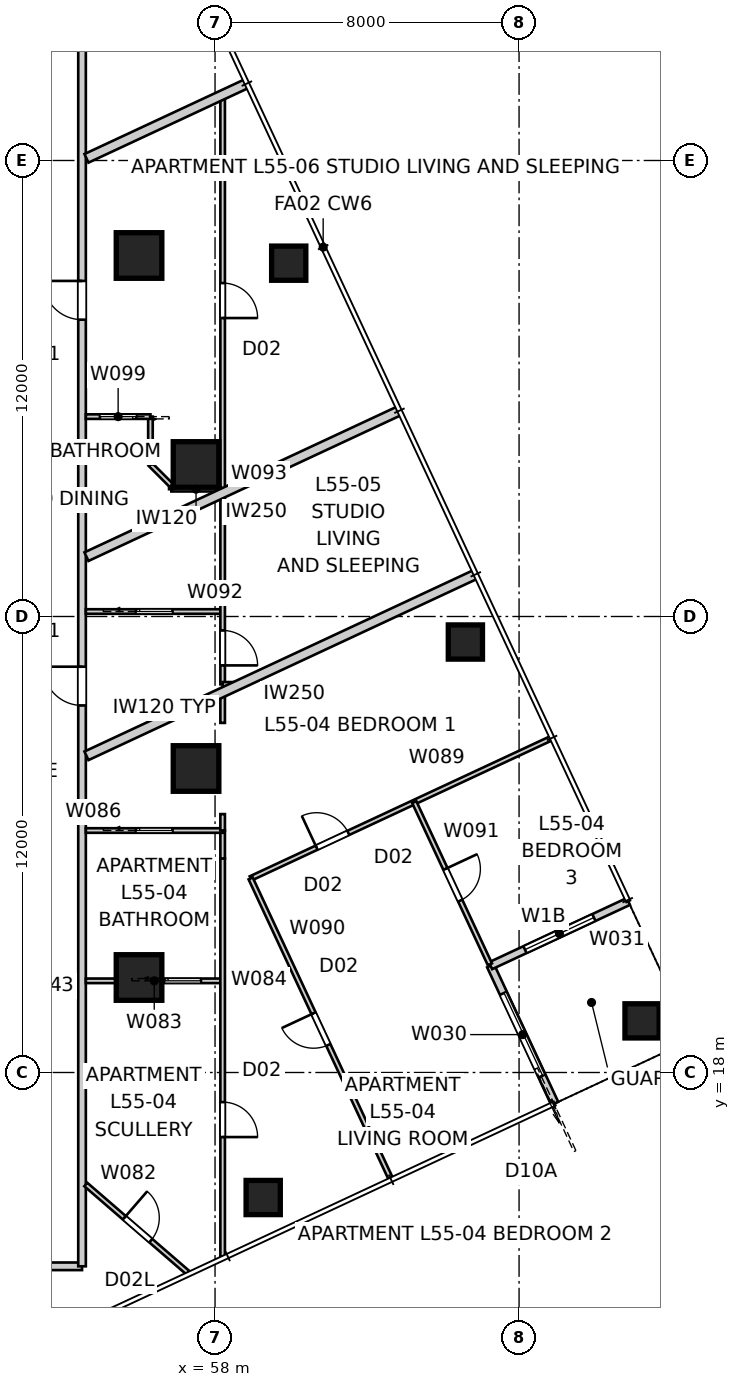
"""IFC4 building model, lengths in metres.
Left out: names, types, materials, properties, quantities, classifications, styles, units other than length and angle.
Written with IfcOpenShell. Run it as: python <this file> out.ifc"""

import sys

from ifc_helpers import new_model, si_unit, direction, frame, frame_2d, origin, origin_2d, place, context, subcontext, project, spatial, rectangle, extrude, element, fill, save


model = new_model("IFC4")
c1 = context("Model", 3, precision=1e-05, world=origin(), true_north=direction((0.0, 1.0)))
c2 = subcontext(c1, "Body", "Model", "MODEL_VIEW")
j1 = project(units=[si_unit("LENGTHUNIT", "METRE"), si_unit("PLANEANGLEUNIT", "RADIAN")], contexts=[c1])
p1 = place(None, origin())
s1 = spatial("IfcSite", under=j1, at=p1, CompositionType="ELEMENT")
p2 = place(p1, origin())
s2 = spatial("IfcBuilding", under=s1, at=p2, CompositionType="ELEMENT")
p3 = place(p2, frame((0.0, 0.0, 199.8)))
s3 = spatial("IfcBuildingStorey", under=s2, at=p3, CompositionType="ELEMENT", Elevation=199.8)
for number, where, z_axis, x_axis in (
    (1, (59.267, 14.71, 0.0), (0.0, 0.0, 1.0), (1.0, 0.0, 0.0)),
    (2, (69.236, 19.359, 0.0), (0.0, 0.0, 1.0), (1.0, 0.0, 0.0)),
    (3, (64.588, 29.328, 0.0), (0.0, 0.0, 1.0), (1.0, 0.0, 0.0)),
    (4, (59.939, 39.298, 0.0), (0.0, 0.0, 1.0), (1.0, 0.0, 0.0)),
):
    element("IfcColumn", number, at=place(p3, frame(where, z_axis=z_axis, x_axis=x_axis)), inside=s3, PredefinedType="COLUMN", context=c2, shape_type="SweptSolid", body=[
        extrude(rectangle(XDim=0.9, YDim=0.9, at=origin_2d()), origin(), (0.0, 0.0, 1.0), 3.2),
    ])
for number, where, z_axis, x_axis in (
    (5, (57.5, 26.0, 0.0), (0.0, 0.0, 1.0), (1.0, 0.0, 0.0)),
    (6, (57.5, 34.0, 0.0), (0.0, 0.0, 1.0), (1.0, 0.0, 0.0)),
    (7, (56.0, 39.5, 0.0), (0.0, 0.0, 1.0), (1.0, 0.0, 0.0)),
    (8, (56.0, 20.5, 0.0), (0.0, 0.0, 1.0), (1.0, 0.0, 0.0)),
):
    element("IfcColumn", number, at=place(p3, frame(where, z_axis=z_axis, x_axis=x_axis)), inside=s3, PredefinedType="COLUMN", context=c2, shape_type="SweptSolid", body=[
        extrude(rectangle(XDim=1.2, YDim=1.2, at=origin_2d()), origin(), (0.0, 0.0, 1.0), 3.4),
    ])
p4 = place(p3, frame((66.94, 17.185, 0.0), z_axis=(0.0, 0.0, 1.0), x_axis=(-0.422658246362, 0.906289140828, 0.0)))
e9 = element("IfcWall", 9, at=p4, inside=s3, PredefinedType="SOLIDWALL", context=c2, shape_type="SweptSolid", body=[
    extrude(rectangle(XDim=4.0, YDim=0.2, at=frame_2d((2.0, 0.0))), origin(), (0.0, 0.0, 1.0), 3.2),
])
p5 = place(p4, frame((0.8, 0.0, 0.0)))
e10 = element("IfcOpeningElement", 10, at=p5, cuts=e9, PredefinedType="OPENING", context=c2, shape_type="SweptSolid", body=[
    extrude(rectangle(XDim=2.4, YDim=2.1, at=frame_2d((1.2, 1.05))), frame((0.0, 0.11, 0.0), z_axis=(0.0, -1.0, 0.0), x_axis=(1.0, 0.0, 0.0)), (0.0, 0.0, 1.0), 0.22),
])
p6 = place(p3, frame((65.25, 20.81, 0.0), z_axis=(0.0, 0.0, 1.0), x_axis=(0.906289140828, 0.422658246362, 0.0)))
e11 = element("IfcWall", 11, at=p6, inside=s3, PredefinedType="SOLIDWALL", context=c2, shape_type="SweptSolid", body=[
    extrude(rectangle(XDim=4.0, YDim=0.2, at=frame_2d((2.0, 0.0))), origin(), (0.0, 0.0, 1.0), 3.2),
])
p7 = place(p6, frame((1.0, 0.0, 0.4)))
e12 = element("IfcOpeningElement", 12, at=p7, cuts=e11, PredefinedType="OPENING", context=c2, shape_type="SweptSolid", body=[
    extrude(rectangle(XDim=2.0, YDim=1.8, at=frame_2d((1.0, 0.9))), frame((0.0, 0.11, 0.0), z_axis=(0.0, -1.0, 0.0), x_axis=(1.0, 0.0, 0.0)), (0.0, 0.0, 1.0), 0.22),
])
p8 = place(p3, frame((46.403, 12.9, 0.0), z_axis=(0.0, 0.0, 1.0), x_axis=(1.0, 0.0, 0.0)))
e13 = element("IfcWall", 13, at=p8, inside=s3, PredefinedType="PARTITIONING", context=c2, shape_type="SweptSolid", body=[
    extrude(rectangle(XDim=8.097, YDim=0.2, at=frame_2d((4.048, 0.0))), origin(), (0.0, 0.0, 1.0), 3.2),
])
p9 = place(p8, frame((4.112, 0.0, 0.0)))
e14 = element("IfcOpeningElement", 14, at=p9, cuts=e13, PredefinedType="OPENING", context=c2, shape_type="SweptSolid", body=[
    extrude(rectangle(XDim=1.02, YDim=2.34, at=frame_2d((0.51, 1.17))), frame((0.0, 0.11, 0.0), z_axis=(0.0, -1.0, 0.0), x_axis=(1.0, 0.0, 0.0)), (0.0, 0.0, 1.0), 0.22),
])
p10 = place(p3, frame((54.5, 12.9, 0.0), z_axis=(0.0, 0.0, 1.0), x_axis=(0.0, 1.0, 0.0)))
e15 = element("IfcWall", 15, at=p10, inside=s3, PredefinedType="PARTITIONING", context=c2, shape_type="SweptSolid", body=[
    extrude(rectangle(XDim=33.8, YDim=0.2, at=frame_2d((16.9, 0.0))), origin(), (0.0, 0.0, 1.0), 3.2),
])
p11 = place(p10, frame((24.911, 0.0, 0.0)))
e16 = element("IfcOpeningElement", 16, at=p11, cuts=e15, PredefinedType="OPENING", context=c2, shape_type="SweptSolid", body=[
    extrude(rectangle(XDim=1.02, YDim=2.34, at=frame_2d((0.51, 1.17))), frame((0.0, 0.11, 0.0), z_axis=(0.0, -1.0, 0.0), x_axis=(1.0, 0.0, 0.0)), (0.0, 0.0, 1.0), 0.22),
])
p12 = place(p10, frame((14.759, 0.0, 0.0)))
e17 = element("IfcOpeningElement", 17, at=p12, cuts=e15, PredefinedType="OPENING", context=c2, shape_type="SweptSolid", body=[
    extrude(rectangle(XDim=1.02, YDim=2.34, at=frame_2d((0.51, 1.17))), frame((0.0, 0.11, 0.0), z_axis=(0.0, -1.0, 0.0), x_axis=(1.0, 0.0, 0.0)), (0.0, 0.0, 1.0), 0.22),
])
p13 = place(p3, frame((62.853, 35.415, 0.0), z_axis=(0.0, 0.0, 1.0), x_axis=(-0.90630664327, -0.422620714548, 0.0)))
e18 = element("IfcWall", 18, at=p13, inside=s3, PredefinedType="PARTITIONING", context=c2, shape_type="SweptSolid", body=[
    extrude(rectangle(XDim=9.088, YDim=0.25, at=frame_2d((4.544, 0.0))), origin(), (0.0, 0.0, 1.0), 3.2),
])
p14 = place(p3, frame((58.838, 44.025, 0.0), z_axis=(0.0, 0.0, 1.0), x_axis=(-0.906317010604, -0.422598481173, 0.0)))
e19 = element("IfcWall", 19, at=p14, inside=s3, PredefinedType="PARTITIONING", context=c2, shape_type="SweptSolid", body=[
    extrude(rectangle(XDim=4.657, YDim=0.25, at=frame_2d((2.329, 0.0))), origin(), (0.0, 0.0, 1.0), 3.2),
])
p15 = place(p3, frame((64.86, 31.11, 0.0), z_axis=(0.0, 0.0, 1.0), x_axis=(-0.906306714884, -0.422620560972, 0.0)))
e20 = element("IfcWall", 20, at=p15, inside=s3, PredefinedType="PARTITIONING", context=c2, shape_type="SweptSolid", body=[
    extrude(rectangle(XDim=11.302, YDim=0.25, at=frame_2d((5.651, 0.0))), origin(), (0.0, 0.0, 1.0), 3.2),
])
p16 = place(p3, frame((54.6, 15.052, 0.0), z_axis=(0.0, 0.0, 1.0), x_axis=(0.756558808476, -0.653925660391, 0.0)))
e21 = element("IfcWall", 21, at=p16, inside=s3, PredefinedType="PARTITIONING", context=c2, shape_type="SweptSolid", body=[
    extrude(rectangle(XDim=3.554, YDim=0.12, at=frame_2d((1.777, 0.0))), origin(), (0.0, 0.0, 1.0), 3.2),
])
p17 = place(p16, frame((1.339, 0.0, 0.0)))
e22 = element("IfcOpeningElement", 22, at=p17, cuts=e21, PredefinedType="OPENING", context=c2, shape_type="SweptSolid", body=[
    extrude(rectangle(XDim=0.92, YDim=2.1, at=frame_2d((0.46, 1.05))), frame((0.0, 0.07, 0.0), z_axis=(0.0, -1.0, 0.0), x_axis=(1.0, 0.0, 0.0)), (0.0, 0.0, 1.0), 0.14),
])
p18 = place(p3, frame((54.6, 20.413, 0.0), z_axis=(0.0, 0.0, 1.0), x_axis=(1.0, 0.0, 0.0)))
e23 = element("IfcWall", 23, at=p18, inside=s3, PredefinedType="PARTITIONING", context=c2, shape_type="SweptSolid", body=[
    extrude(rectangle(XDim=3.6, YDim=0.12, at=frame_2d((1.8, 0.0))), origin(), (0.0, 0.0, 1.0), 3.2),
])
p19 = place(p18, frame((2.07, 0.0, 0.0)))
e24 = element("IfcOpeningElement", 24, at=p19, cuts=e23, PredefinedType="OPENING", context=c2, shape_type="SweptSolid", body=[
    extrude(rectangle(XDim=0.96, YDim=2.1, at=frame_2d((0.48, 1.05))), frame((0.0, 0.07, 0.0), z_axis=(0.0, -1.0, 0.0), x_axis=(1.0, 0.0, 0.0)), (0.0, 0.0, 1.0), 0.14),
])
p20 = place(p3, frame((58.2, 23.632, 0.0), z_axis=(0.0, 0.0, 1.0), x_axis=(0.0, -1.0, 0.0)))
e25 = element("IfcWall", 25, at=p20, inside=s3, PredefinedType="PARTITIONING", context=c2, shape_type="SweptSolid", body=[
    extrude(rectangle(XDim=10.479, YDim=0.12, at=frame_2d((5.24, 0.0))), origin(), (0.0, 0.0, 1.0), 3.2),
])
p21 = place(p20, frame((6.411, 0.0, 0.0)))
e26 = element("IfcOpeningElement", 26, at=p21, cuts=e25, PredefinedType="OPENING", context=c2, shape_type="SweptSolid", body=[
    extrude(rectangle(XDim=0.92, YDim=2.34, at=frame_2d((0.46, 1.17))), frame((0.0, 0.07, 0.0), z_axis=(0.0, -1.0, 0.0), x_axis=(1.0, 0.0, 0.0)), (0.0, 0.0, 1.0), 0.14),
])
p22 = place(p3, frame((54.6, 24.368, 0.0), z_axis=(0.0, 0.0, 1.0), x_axis=(1.0, 0.0, 0.0)))
e27 = element("IfcWall", 27, at=p22, inside=s3, PredefinedType="PARTITIONING", context=c2, shape_type="SweptSolid", body=[
    extrude(rectangle(XDim=3.6, YDim=0.12, at=frame_2d((1.8, 0.0))), origin(), (0.0, 0.0, 1.0), 3.2),
])
p23 = place(p22, frame((1.32, 0.0, 0.0)))
e28 = element("IfcOpeningElement", 28, at=p23, cuts=e27, PredefinedType="OPENING", context=c2, shape_type="SweptSolid", body=[
    extrude(rectangle(XDim=0.96, YDim=2.1, at=frame_2d((0.48, 1.05))), frame((0.0, 0.07, 0.0), z_axis=(0.0, -1.0, 0.0), x_axis=(1.0, 0.0, 0.0)), (0.0, 0.0, 1.0), 0.14),
])
p24 = place(p3, frame((58.2, 24.8, 0.0), z_axis=(0.0, 0.0, 1.0), x_axis=(0.0, -1.0, 0.0)))
e29 = element("IfcWall", 29, at=p24, inside=s3, PredefinedType="PARTITIONING", context=c2, shape_type="SweptSolid", body=[
    extrude(rectangle(XDim=0.432, YDim=0.12, at=frame_2d((0.216, 0.0))), origin(), (0.0, 0.0, 1.0), 3.2),
])
p25 = place(p3, frame((58.2, 28.005, 0.0), z_axis=(0.0, 0.0, 1.0), x_axis=(0.0, -1.0, 0.0)))
e30 = element("IfcWall", 30, at=p25, inside=s3, PredefinedType="PARTITIONING", context=c2, shape_type="SweptSolid", body=[
    extrude(rectangle(XDim=0.805, YDim=0.12, at=frame_2d((0.402, 0.0))), origin(), (0.0, 0.0, 1.0), 3.2),
])
p26 = place(p3, frame((58.937, 23.107, 0.0), z_axis=(0.0, 0.0, 1.0), x_axis=(0.906298398156, 0.422638395676, 0.0)))
e31 = element("IfcWall", 31, at=p26, inside=s3, PredefinedType="PARTITIONING", context=c2, shape_type="SweptSolid", body=[
    extrude(rectangle(XDim=8.71, YDim=0.12, at=frame_2d((4.355, 0.0))), origin(), (0.0, 0.0, 1.0), 3.2),
])
p27 = place(p26, frame((1.915, 0.0, 0.0)))
e32 = element("IfcOpeningElement", 32, at=p27, cuts=e31, PredefinedType="OPENING", context=c2, shape_type="SweptSolid", body=[
    extrude(rectangle(XDim=0.92, YDim=2.34, at=frame_2d((0.46, 1.17))), frame((0.0, 0.07, 0.0), z_axis=(0.0, -1.0, 0.0), x_axis=(1.0, 0.0, 0.0)), (0.0, 0.0, 1.0), 0.14),
])
p28 = place(p3, frame((62.618, 15.213, 0.0), z_axis=(0.0, 0.0, 1.0), x_axis=(-0.422604635972, 0.906314140712, 0.0)))
e33 = element("IfcWall", 33, at=p28, inside=s3, PredefinedType="PARTITIONING", context=c2, shape_type="SweptSolid", body=[
    extrude(rectangle(XDim=8.71, YDim=0.12, at=frame_2d((4.355, 0.0))), origin(), (0.0, 0.0, 1.0), 3.2),
])
p29 = place(p28, frame((3.875, 0.0, 0.0)))
e34 = element("IfcOpeningElement", 34, at=p29, cuts=e33, PredefinedType="OPENING", context=c2, shape_type="SweptSolid", body=[
    extrude(rectangle(XDim=0.92, YDim=2.34, at=frame_2d((0.46, 1.17))), frame((0.0, 0.07, 0.0), z_axis=(0.0, -1.0, 0.0), x_axis=(1.0, 0.0, 0.0)), (0.0, 0.0, 1.0), 0.14),
])
p30 = place(p3, frame((63.242, 25.115, 0.0), z_axis=(0.0, 0.0, 1.0), x_axis=(0.422601682441, -0.906315517906, 0.0)))
e35 = element("IfcWall", 35, at=p30, inside=s3, PredefinedType="PARTITIONING", context=c2, shape_type="SweptSolid", body=[
    extrude(rectangle(XDim=4.71, YDim=0.12, at=frame_2d((2.355, 0.0))), origin(), (0.0, 0.0, 1.0), 3.2),
])
p31 = place(p30, frame((1.94, 0.0, 0.0)))
e36 = element("IfcOpeningElement", 36, at=p31, cuts=e35, PredefinedType="OPENING", context=c2, shape_type="SweptSolid", body=[
    extrude(rectangle(XDim=0.92, YDim=2.34, at=frame_2d((0.46, 1.17))), frame((0.0, 0.07, 0.0), z_axis=(0.0, -1.0, 0.0), x_axis=(1.0, 0.0, 0.0)), (0.0, 0.0, 1.0), 0.14),
])
p32 = place(p3, frame((54.6, 30.131, 0.0), z_axis=(0.0, 0.0, 1.0), x_axis=(1.0, 0.0, 0.0)))
e37 = element("IfcWall", 37, at=p32, inside=s3, PredefinedType="PARTITIONING", context=c2, shape_type="SweptSolid", body=[
    extrude(rectangle(XDim=3.6, YDim=0.12, at=frame_2d((1.8, 0.0))), origin(), (0.0, 0.0, 1.0), 3.2),
])
p33 = place(p32, frame((1.32, 0.0, 0.0)))
e38 = element("IfcOpeningElement", 38, at=p33, cuts=e37, PredefinedType="OPENING", context=c2, shape_type="SweptSolid", body=[
    extrude(rectangle(XDim=0.96, YDim=2.1, at=frame_2d((0.48, 1.05))), frame((0.0, 0.07, 0.0), z_axis=(0.0, -1.0, 0.0), x_axis=(1.0, 0.0, 0.0)), (0.0, 0.0, 1.0), 0.14),
])
p34 = place(p3, frame((58.2, 43.728, 0.0), z_axis=(0.0, 0.0, 1.0), x_axis=(0.0, -1.0, 0.0)))
e39 = element("IfcWall", 39, at=p34, inside=s3, PredefinedType="PARTITIONING", context=c2, shape_type="SweptSolid", body=[
    extrude(rectangle(XDim=15.513, YDim=0.12, at=frame_2d((7.757, 0.0))), origin(), (0.0, 0.0, 1.0), 3.2),
])
p35 = place(p34, frame((4.954, 0.0, 0.0)))
e40 = element("IfcOpeningElement", 40, at=p35, cuts=e39, PredefinedType="OPENING", context=c2, shape_type="SweptSolid", body=[
    extrude(rectangle(XDim=0.92, YDim=2.34, at=frame_2d((0.46, 1.17))), frame((0.0, 0.07, 0.0), z_axis=(0.0, -1.0, 0.0), x_axis=(1.0, 0.0, 0.0)), (0.0, 0.0, 1.0), 0.14),
])
p36 = place(p34, frame((14.095, 0.0, 0.0)))
e41 = element("IfcOpeningElement", 41, at=p36, cuts=e39, PredefinedType="OPENING", context=c2, shape_type="SweptSolid", body=[
    extrude(rectangle(XDim=0.92, YDim=2.34, at=frame_2d((0.46, 1.17))), frame((0.0, 0.07, 0.0), z_axis=(0.0, -1.0, 0.0), x_axis=(1.0, 0.0, 0.0)), (0.0, 0.0, 1.0), 0.14),
])
p37 = place(p3, frame((58.2, 28.215, 0.0), z_axis=(0.0, 0.0, 1.0), x_axis=(1.0, 0.0, 0.0)))
e42 = element("IfcWall", 42, at=p37, inside=s3, PredefinedType="PARTITIONING", context=c2, shape_type="SweptSolid", body=[
    extrude(rectangle(XDim=0.45, YDim=0.12, at=frame_2d((0.225, 0.0))), origin(), (0.0, 0.0, 1.0), 3.2),
])
p38 = place(p3, frame((58.15, 33.35, 0.0), z_axis=(0.0, 0.0, 1.0), x_axis=(-1.0, 0.0, 0.0)))
e43 = element("IfcWall", 43, at=p38, inside=s3, PredefinedType="PARTITIONING", context=c2, shape_type="SweptSolid", body=[
    extrude(rectangle(XDim=1.3, YDim=0.12, at=frame_2d((0.65, 0.0))), origin(), (0.0, 0.0, 1.0), 3.2),
])
p39 = place(p3, frame((56.85, 33.45, 0.0), z_axis=(0.0, 0.0, 1.0), x_axis=(-0.707106781187, 0.707106781187, 0.0)))
e44 = element("IfcWall", 44, at=p39, inside=s3, PredefinedType="PARTITIONING", context=c2, shape_type="SweptSolid", body=[
    extrude(rectangle(XDim=0.778, YDim=0.12, at=frame_2d((0.389, 0.0))), origin(), (0.0, 0.0, 1.0), 3.2),
])
p40 = place(p3, frame((56.3, 34.0, 0.0), z_axis=(0.0, 0.0, 1.0), x_axis=(0.0, 1.0, 0.0)))
e45 = element("IfcWall", 45, at=p40, inside=s3, PredefinedType="PARTITIONING", context=c2, shape_type="SweptSolid", body=[
    extrude(rectangle(XDim=1.26, YDim=0.12, at=frame_2d((0.63, 0.0))), origin(), (0.0, 0.0, 1.0), 3.2),
])
p41 = place(p3, frame((56.3, 35.26, 0.0), z_axis=(0.0, 0.0, 1.0), x_axis=(-1.0, 0.0, 0.0)))
e46 = element("IfcWall", 46, at=p41, inside=s3, PredefinedType="PARTITIONING", context=c2, shape_type="SweptSolid", body=[
    extrude(rectangle(XDim=1.7, YDim=0.12, at=frame_2d((0.85, 0.0))), origin(), (0.0, 0.0, 1.0), 3.2),
])
p42 = place(p41, frame((0.37, 0.0, 0.0)))
e47 = element("IfcOpeningElement", 47, at=p42, cuts=e46, PredefinedType="OPENING", context=c2, shape_type="SweptSolid", body=[
    extrude(rectangle(XDim=0.96, YDim=2.1, at=frame_2d((0.48, 1.05))), frame((0.0, 0.07, 0.0), z_axis=(0.0, -1.0, 0.0), x_axis=(1.0, 0.0, 0.0)), (0.0, 0.0, 1.0), 0.14),
])
p43 = place(p3, frame((58.2, 23.632, 0.0), z_axis=(0.0, 0.0, 1.0), x_axis=(0.0, 1.0, 0.0)))
e48 = element("IfcWall", 48, at=p43, inside=s3, PredefinedType="PARTITIONING", context=c2, shape_type="SweptSolid", body=[
    extrude(rectangle(XDim=0.736, YDim=0.12, at=frame_2d((0.368, 0.0))), origin(), (0.0, 0.0, 1.0), 3.2),
])
p44 = place(p3, frame((56.85, 33.35, 0.0), z_axis=(0.0, 0.0, 1.0), x_axis=(0.0, 1.0, 0.0)))
e49 = element("IfcWall", 49, at=p44, inside=s3, PredefinedType="PARTITIONING", context=c2, shape_type="SweptSolid", body=[
    extrude(rectangle(XDim=0.1, YDim=0.12, at=frame_2d((0.05, 0.0))), origin(), (0.0, 0.0, 1.0), 3.2),
])
p45 = place(p5, origin())
e50 = element("IfcDoor", 50, at=p45, inside=s3, OperationType="SLIDING_TO_LEFT", PredefinedType="DOOR", context=c2, shape_type="SweptSolid", body=[
    extrude(rectangle(XDim=2.4, YDim=2.1, at=frame_2d((1.2, 1.05))), frame((0.0, 0.025, 0.0), z_axis=(0.0, -1.0, 0.0), x_axis=(1.0, 0.0, 0.0)), (0.0, 0.0, 1.0), 0.05),
])
fill(e10, e50)
p46 = place(p7, origin())
e51 = element("IfcWindow", 51, at=p46, inside=s3, PartitioningType="SINGLE_PANEL", PredefinedType="WINDOW", context=c2, shape_type="SweptSolid", body=[
    extrude(rectangle(XDim=2.0, YDim=1.8, at=frame_2d((1.0, 0.9))), frame((0.0, 0.03, 0.0), z_axis=(0.0, -1.0, 0.0), x_axis=(1.0, 0.0, 0.0)), (0.0, 0.0, 1.0), 0.06),
])
fill(e12, e51)
p47 = place(p11, origin())
e52 = element("IfcDoor", 52, at=p47, inside=s3, OperationType="SINGLE_SWING_RIGHT", PredefinedType="DOOR", context=c2, shape_type="SweptSolid", body=[
    extrude(rectangle(XDim=1.02, YDim=2.34, at=frame_2d((0.51, 1.17))), frame((0.0, 0.025, 0.0), z_axis=(0.0, -1.0, 0.0), x_axis=(1.0, 0.0, 0.0)), (0.0, 0.0, 1.0), 0.05),
])
fill(e16, e52)
p48 = place(p12, origin())
e53 = element("IfcDoor", 53, at=p48, inside=s3, OperationType="SINGLE_SWING_RIGHT", PredefinedType="DOOR", context=c2, shape_type="SweptSolid", body=[
    extrude(rectangle(XDim=1.02, YDim=2.34, at=frame_2d((0.51, 1.17))), frame((0.0, 0.025, 0.0), z_axis=(0.0, -1.0, 0.0), x_axis=(1.0, 0.0, 0.0)), (0.0, 0.0, 1.0), 0.05),
])
fill(e17, e53)
p49 = place(p35, origin())
e54 = element("IfcDoor", 54, at=p49, inside=s3, OperationType="SINGLE_SWING_RIGHT", PredefinedType="DOOR", context=c2, shape_type="SweptSolid", body=[
    extrude(rectangle(XDim=0.92, YDim=2.34, at=frame_2d((0.46, 1.17))), frame((0.0, 0.025, 0.0), z_axis=(0.0, -1.0, 0.0), x_axis=(1.0, 0.0, 0.0)), (0.0, 0.0, 1.0), 0.05),
])
fill(e40, e54)
p50 = place(p42, origin())
e55 = element("IfcDoor", 55, at=p50, inside=s3, OperationType="SLIDING_TO_LEFT", PredefinedType="DOOR", context=c2, shape_type="SweptSolid", body=[
    extrude(rectangle(XDim=0.96, YDim=2.1, at=frame_2d((0.48, 1.05))), frame((0.0, 0.025, 0.0), z_axis=(0.0, -1.0, 0.0), x_axis=(1.0, 0.0, 0.0)), (0.0, 0.0, 1.0), 0.05),
])
fill(e47, e55)
p51 = place(p17, origin())
e56 = element("IfcDoor", 56, at=p51, inside=s3, OperationType="SINGLE_SWING_LEFT", PredefinedType="DOOR", context=c2, shape_type="SweptSolid", body=[
    extrude(rectangle(XDim=0.92, YDim=2.1, at=frame_2d((0.46, 1.05))), frame((0.0, 0.025, 0.0), z_axis=(0.0, -1.0, 0.0), x_axis=(1.0, 0.0, 0.0)), (0.0, 0.0, 1.0), 0.05),
])
fill(e22, e56)
p52 = place(p33, origin())
e57 = element("IfcDoor", 57, at=p52, inside=s3, OperationType="SLIDING_TO_LEFT", PredefinedType="DOOR", context=c2, shape_type="SweptSolid", body=[
    extrude(rectangle(XDim=0.96, YDim=2.1, at=frame_2d((0.48, 1.05))), frame((0.0, 0.025, 0.0), z_axis=(0.0, -1.0, 0.0), x_axis=(1.0, 0.0, 0.0)), (0.0, 0.0, 1.0), 0.05),
])
fill(e38, e57)
p53 = place(p36, origin())
e58 = element("IfcDoor", 58, at=p53, inside=s3, OperationType="SINGLE_SWING_RIGHT", PredefinedType="DOOR", context=c2, shape_type="SweptSolid", body=[
    extrude(rectangle(XDim=0.92, YDim=2.34, at=frame_2d((0.46, 1.17))), frame((0.0, 0.025, 0.0), z_axis=(0.0, -1.0, 0.0), x_axis=(1.0, 0.0, 0.0)), (0.0, 0.0, 1.0), 0.05),
])
fill(e41, e58)
p54 = place(p21, origin())
e59 = element("IfcDoor", 59, at=p54, inside=s3, OperationType="SINGLE_SWING_RIGHT", PredefinedType="DOOR", context=c2, shape_type="SweptSolid", body=[
    extrude(rectangle(XDim=0.92, YDim=2.34, at=frame_2d((0.46, 1.17))), frame((0.0, 0.025, 0.0), z_axis=(0.0, -1.0, 0.0), x_axis=(1.0, 0.0, 0.0)), (0.0, 0.0, 1.0), 0.05),
])
fill(e26, e59)
p55 = place(p19, origin())
e60 = element("IfcDoor", 60, at=p55, inside=s3, OperationType="SLIDING_TO_LEFT", PredefinedType="DOOR", context=c2, shape_type="SweptSolid", body=[
    extrude(rectangle(XDim=0.96, YDim=2.1, at=frame_2d((0.48, 1.05))), frame((0.0, 0.025, 0.0), z_axis=(0.0, -1.0, 0.0), x_axis=(1.0, 0.0, 0.0)), (0.0, 0.0, 1.0), 0.05),
])
fill(e24, e60)
p56 = place(p23, origin())
e61 = element("IfcDoor", 61, at=p56, inside=s3, OperationType="SLIDING_TO_LEFT", PredefinedType="DOOR", context=c2, shape_type="SweptSolid", body=[
    extrude(rectangle(XDim=0.96, YDim=2.1, at=frame_2d((0.48, 1.05))), frame((0.0, 0.025, 0.0), z_axis=(0.0, -1.0, 0.0), x_axis=(1.0, 0.0, 0.0)), (0.0, 0.0, 1.0), 0.05),
])
fill(e28, e61)
p57 = place(p29, origin())
e62 = element("IfcDoor", 62, at=p57, inside=s3, OperationType="SINGLE_SWING_RIGHT", PredefinedType="DOOR", context=c2, shape_type="SweptSolid", body=[
    extrude(rectangle(XDim=0.92, YDim=2.34, at=frame_2d((0.46, 1.17))), frame((0.0, 0.025, 0.0), z_axis=(0.0, -1.0, 0.0), x_axis=(1.0, 0.0, 0.0)), (0.0, 0.0, 1.0), 0.05),
])
fill(e34, e62)
p58 = place(p31, origin())
e63 = element("IfcDoor", 63, at=p58, inside=s3, OperationType="SINGLE_SWING_LEFT", PredefinedType="DOOR", context=c2, shape_type="SweptSolid", body=[
    extrude(rectangle(XDim=0.92, YDim=2.34, at=frame_2d((0.46, 1.17))), frame((0.0, 0.025, 0.0), z_axis=(0.0, -1.0, 0.0), x_axis=(1.0, 0.0, 0.0)), (0.0, 0.0, 1.0), 0.05),
])
fill(e36, e63)
p59 = place(p27, origin())
e64 = element("IfcDoor", 64, at=p59, inside=s3, OperationType="SINGLE_SWING_LEFT", PredefinedType="DOOR", context=c2, shape_type="SweptSolid", body=[
    extrude(rectangle(XDim=0.92, YDim=2.34, at=frame_2d((0.46, 1.17))), frame((0.0, 0.025, 0.0), z_axis=(0.0, -1.0, 0.0), x_axis=(1.0, 0.0, 0.0)), (0.0, 0.0, 1.0), 0.05),
])
fill(e32, e64)
save(model, sys.argv[1])
